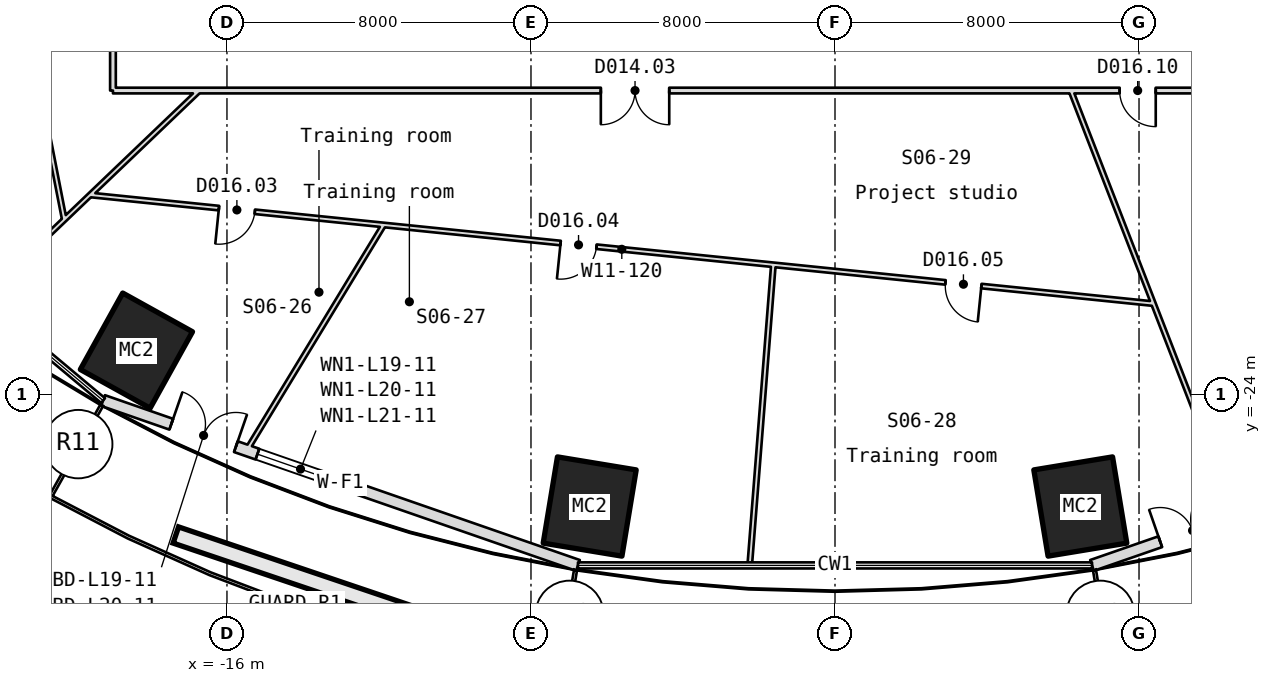
"""IFC4 building model, lengths in metres.
Left out: names, types, materials, properties, quantities, classifications, styles, units other than length and angle.
Written with IfcOpenShell. Run it as: python <this file> out.ifc"""

import sys

from ifc_helpers import new_model, si_unit, direction, frame, frame_2d, origin, origin_2d, place, context, subcontext, project, spatial, rectangle, hollow_rectangle, extrude, element, fill, save


model = new_model("IFC4")
c1 = context("Model", 3, precision=1e-05, world=origin(), true_north=direction((0.0, 1.0)))
c2 = subcontext(c1, "Body", "Model", "MODEL_VIEW")
j1 = project(units=[si_unit("LENGTHUNIT", "METRE"), si_unit("PLANEANGLEUNIT", "RADIAN")], contexts=[c1])
p1 = place(None, origin())
s1 = spatial("IfcSite", under=j1, at=p1, CompositionType="ELEMENT")
p2 = place(p1, origin())
s2 = spatial("IfcBuilding", under=s1, at=p2, CompositionType="ELEMENT")
p3 = place(p2, frame((0.0, 0.0, 95.25)))
s3 = spatial("IfcBuildingStorey", under=s2, at=p3, CompositionType="ELEMENT", Elevation=95.25)
for number, where, z_axis, x_axis in (
    (1, (-18.383, -22.843, -0.18), (0.0, 0.0, 1.0), (-0.874, 0.485, 0.0)),
    (2, (-6.455, -26.945, -0.18), (0.0, 0.0, 1.0), (-0.987, 0.163, 0.0)),
    (3, (6.455, -26.945, -0.18), (0.0, 0.0, 1.0), (-0.987, -0.163, 0.0)),
):
    element("IfcColumn", number, at=place(p3, frame(where, z_axis=z_axis, x_axis=x_axis)), inside=s3, PredefinedType="COLUMN", context=c2, shape_type="SweptSolid", body=[
        extrude(hollow_rectangle(XDim=2.1, YDim=2.3, WallThickness=0.085, at=origin_2d()), origin(), (0.0, 0.0, 1.0), 4.15),
    ])
p4 = place(p3, frame((-19.26, -24.157, 0.0), z_axis=(0.0, 0.0, 1.0), x_axis=(0.944700030718, -0.327935743647, 0.0)))
e4 = element("IfcWall", 4, at=p4, inside=s3, PredefinedType="SOLIDWALL", context=c2, shape_type="SweptSolid", body=[
    extrude(rectangle(XDim=13.229, YDim=0.3, at=frame_2d((6.614, 0.0))), origin(), (0.0, 0.0, 1.0), 3.97),
])
p5 = place(p4, frame((1.9, 0.0, 0.0)))
e5 = element("IfcOpeningElement", 5, at=p5, cuts=e4, PredefinedType="OPENING", context=c2, shape_type="SweptSolid", body=[
    extrude(rectangle(XDim=1.8, YDim=2.4, at=frame_2d((0.9, 1.2))), frame((0.0, 0.16, 0.0), z_axis=(0.0, -1.0, 0.0), x_axis=(1.0, 0.0, 0.0)), (0.0, 0.0, 1.0), 0.32),
])
p6 = place(p4, frame((4.3, 0.0, 0.9)))
e6 = element("IfcOpeningElement", 6, at=p6, cuts=e4, PredefinedType="OPENING", context=c2, shape_type="SweptSolid", body=[
    extrude(rectangle(XDim=2.4, YDim=1.5, at=frame_2d((1.2, 0.75))), frame((0.0, 0.16, 0.0), z_axis=(0.0, -1.0, 0.0), x_axis=(1.0, 0.0, 0.0)), (0.0, 0.0, 1.0), 0.32),
])
p7 = place(p3, frame((6.763, -28.495, 0.0), z_axis=(0.0, 0.0, 1.0), x_axis=(0.944700030718, 0.327935743647, 0.0)))
e7 = element("IfcWall", 7, at=p7, inside=s3, PredefinedType="SOLIDWALL", context=c2, shape_type="SweptSolid", body=[
    extrude(rectangle(XDim=13.229, YDim=0.3, at=frame_2d((6.614, 0.0))), origin(), (0.0, 0.0, 1.0), 3.97),
])
p8 = place(p7, frame((1.9, 0.0, 0.0)))
e8 = element("IfcOpeningElement", 8, at=p8, cuts=e7, PredefinedType="OPENING", context=c2, shape_type="SweptSolid", body=[
    extrude(rectangle(XDim=1.8, YDim=2.4, at=frame_2d((0.9, 1.2))), frame((0.0, 0.16, 0.0), z_axis=(0.0, -1.0, 0.0), x_axis=(1.0, 0.0, 0.0)), (0.0, 0.0, 1.0), 0.32),
])
p9 = place(p7, frame((4.3, 0.0, 0.9)))
e9 = element("IfcOpeningElement", 9, at=p9, cuts=e7, PredefinedType="OPENING", context=c2, shape_type="SweptSolid", body=[
    extrude(rectangle(XDim=2.4, YDim=1.5, at=frame_2d((1.2, 0.75))), frame((0.0, 0.16, 0.0), z_axis=(0.0, -1.0, 0.0), x_axis=(1.0, 0.0, 0.0)), (0.0, 0.0, 1.0), 0.32),
])
p10 = place(p3, frame((-24.299, 1.102, 0.0), z_axis=(0.0, 0.0, 1.0), x_axis=(0.192428584769, -0.98131098015, 0.0)))
e10 = element("IfcWall", 10, at=p10, inside=s3, PredefinedType="PARTITIONING", context=c2, shape_type="SweptSolid", body=[
    extrude(rectangle(XDim=20.888, YDim=0.12, at=frame_2d((10.444, 0.0))), origin(), (0.0, 0.0, 1.0), 3.97),
])
p11 = place(p3, frame((-19.601, -18.747, 0.0), z_axis=(0.0, 0.0, 1.0), x_axis=(0.994814570483, -0.101705311343, 0.0)))
e11 = element("IfcWall", 11, at=p11, inside=s3, PredefinedType="PARTITIONING", context=c2, shape_type="SweptSolid", body=[
    extrude(rectangle(XDim=28.126, YDim=0.12, at=frame_2d((14.063, 0.0))), origin(), (0.0, 0.0, 1.0), 3.97),
])
p12 = place(p11, frame((3.407, 0.0, 0.0)))
e12 = element("IfcOpeningElement", 12, at=p12, cuts=e11, PredefinedType="OPENING", context=c2, shape_type="SweptSolid", body=[
    extrude(rectangle(XDim=0.95, YDim=2.1, at=frame_2d((0.475, 1.05))), frame((0.0, 0.07, 0.0), z_axis=(0.0, -1.0, 0.0), x_axis=(1.0, 0.0, 0.0)), (0.0, 0.0, 1.0), 0.14),
])
p13 = place(p11, frame((12.444, 0.0, 0.0)))
e13 = element("IfcOpeningElement", 13, at=p13, cuts=e11, PredefinedType="OPENING", context=c2, shape_type="SweptSolid", body=[
    extrude(rectangle(XDim=0.95, YDim=2.1, at=frame_2d((0.475, 1.05))), frame((0.0, 0.07, 0.0), z_axis=(0.0, -1.0, 0.0), x_axis=(1.0, 0.0, 0.0)), (0.0, 0.0, 1.0), 0.14),
])
p14 = place(p11, frame((22.625, 0.0, 0.0)))
e14 = element("IfcOpeningElement", 14, at=p14, cuts=e11, PredefinedType="OPENING", context=c2, shape_type="SweptSolid", body=[
    extrude(rectangle(XDim=0.95, YDim=2.1, at=frame_2d((0.475, 1.05))), frame((0.0, 0.07, 0.0), z_axis=(0.0, -1.0, 0.0), x_axis=(1.0, 0.0, 0.0)), (0.0, 0.0, 1.0), 0.14),
])
p15 = place(p3, frame((-19.0, -16.0, 0.0), z_axis=(0.0, 0.0, 1.0), x_axis=(0.0, 1.0, 0.0)))
e15 = element("IfcWall", 15, at=p15, inside=s3, PredefinedType="PARTITIONING", context=c2, shape_type="SweptSolid", body=[
    extrude(rectangle(XDim=32.0, YDim=0.15, at=frame_2d((16.0, 0.0))), origin(), (0.0, 0.0, 1.0), 3.97),
])
p16 = place(p15, frame((12.057, 0.0, 0.0)))
e16 = element("IfcOpeningElement", 16, at=p16, cuts=e15, PredefinedType="OPENING", context=c2, shape_type="SweptSolid", body=[
    extrude(rectangle(XDim=0.95, YDim=2.1, at=frame_2d((0.475, 1.05))), frame((0.0, 0.085, 0.0), z_axis=(0.0, -1.0, 0.0), x_axis=(1.0, 0.0, 0.0)), (0.0, 0.0, 1.0), 0.17),
])
p17 = place(p15, frame((3.626, 0.0, 0.0)))
e17 = element("IfcOpeningElement", 17, at=p17, cuts=e15, PredefinedType="OPENING", context=c2, shape_type="SweptSolid", body=[
    extrude(rectangle(XDim=0.95, YDim=2.1, at=frame_2d((0.475, 1.05))), frame((0.0, 0.085, 0.0), z_axis=(0.0, -1.0, 0.0), x_axis=(1.0, 0.0, 0.0)), (0.0, 0.0, 1.0), 0.17),
])
p18 = place(p15, frame((19.428, 0.0, 0.0)))
e18 = element("IfcOpeningElement", 18, at=p18, cuts=e15, PredefinedType="OPENING", context=c2, shape_type="SweptSolid", body=[
    extrude(rectangle(XDim=1.8, YDim=2.1, at=frame_2d((0.9, 1.05))), frame((0.0, 0.085, 0.0), z_axis=(0.0, -1.0, 0.0), x_axis=(1.0, 0.0, 0.0)), (0.0, 0.0, 1.0), 0.17),
])
p19 = place(p3, frame((-16.729, -16.0, 0.0), z_axis=(0.0, 0.0, 1.0), x_axis=(-0.722671289977, -0.69119187397, 0.0)))
e19 = element("IfcWall", 19, at=p19, inside=s3, PredefinedType="PARTITIONING", context=c2, shape_type="SweptSolid", body=[
    extrude(rectangle(XDim=7.926, YDim=0.12, at=frame_2d((3.963, 0.0))), origin(), (0.0, 0.0, 1.0), 3.97),
])
p20 = place(p3, frame((-15.482, -25.469, 0.0), z_axis=(0.0, 0.0, 1.0), x_axis=(0.519421340377, 0.854518268477, 0.0)))
e20 = element("IfcWall", 20, at=p20, inside=s3, PredefinedType="PARTITIONING", context=c2, shape_type="SweptSolid", body=[
    extrude(rectangle(XDim=6.942, YDim=0.12, at=frame_2d((3.471, 0.0))), origin(), (0.0, 0.0, 1.0), 3.97),
])
p21 = place(p3, frame((-2.244, -28.495, 0.0), z_axis=(0.0, 0.0, 1.0), x_axis=(0.07852464167, 0.996912172987, 0.0)))
e21 = element("IfcWall", 21, at=p21, inside=s3, PredefinedType="PARTITIONING", context=c2, shape_type="SweptSolid", body=[
    extrude(rectangle(XDim=7.934, YDim=0.12, at=frame_2d((3.967, 0.0))), origin(), (0.0, 0.0, 1.0), 3.97),
])
p22 = place(p3, frame((6.205, -16.0, 0.0), z_axis=(0.0, 0.0, 1.0), x_axis=(0.361589601178, -0.932337364005, 0.0)))
e22 = element("IfcWall", 22, at=p22, inside=s3, PredefinedType="PARTITIONING", context=c2, shape_type="SweptSolid", body=[
    extrude(rectangle(XDim=11.995, YDim=0.12, at=frame_2d((5.997, 0.0))), origin(), (0.0, 0.0, 1.0), 3.97),
])
p23 = place(p3, frame((19.0, -16.0, 0.0), z_axis=(0.0, 0.0, 1.0), x_axis=(-1.0, 0.0, 0.0)))
e23 = element("IfcWall", 23, at=p23, inside=s3, PredefinedType="PARTITIONING", context=c2, shape_type="SweptSolid", body=[
    extrude(rectangle(XDim=38.0, YDim=0.15, at=frame_2d((19.0, 0.0))), origin(), (0.0, 0.0, 1.0), 3.97),
])
p24 = place(p23, frame((23.362, 0.0, 0.0)))
e24 = element("IfcOpeningElement", 24, at=p24, cuts=e23, PredefinedType="OPENING", context=c2, shape_type="SweptSolid", body=[
    extrude(rectangle(XDim=1.8, YDim=2.1, at=frame_2d((0.9, 1.05))), frame((0.0, 0.085, 0.0), z_axis=(0.0, -1.0, 0.0), x_axis=(1.0, 0.0, 0.0)), (0.0, 0.0, 1.0), 0.17),
])
p25 = place(p23, frame((6.62, 0.0, 0.0)))
e25 = element("IfcOpeningElement", 25, at=p25, cuts=e23, PredefinedType="OPENING", context=c2, shape_type="SweptSolid", body=[
    extrude(rectangle(XDim=0.95, YDim=2.1, at=frame_2d((0.475, 1.05))), frame((0.0, 0.085, 0.0), z_axis=(0.0, -1.0, 0.0), x_axis=(1.0, 0.0, 0.0)), (0.0, 0.0, 1.0), 0.17),
])
p26 = place(p23, frame((1.982, 0.0, 0.0)))
e26 = element("IfcOpeningElement", 26, at=p26, cuts=e23, PredefinedType="OPENING", context=c2, shape_type="SweptSolid", body=[
    extrude(rectangle(XDim=0.95, YDim=2.1, at=frame_2d((0.475, 1.05))), frame((0.0, 0.085, 0.0), z_axis=(0.0, -1.0, 0.0), x_axis=(1.0, 0.0, 0.0)), (0.0, 0.0, 1.0), 0.17),
])
p27 = place(p23, frame((10.56, 0.0, 0.0)))
e27 = element("IfcOpeningElement", 27, at=p27, cuts=e23, PredefinedType="OPENING", context=c2, shape_type="SweptSolid", body=[
    extrude(rectangle(XDim=0.95, YDim=2.1, at=frame_2d((0.475, 1.05))), frame((0.0, 0.085, 0.0), z_axis=(0.0, -1.0, 0.0), x_axis=(1.0, 0.0, 0.0)), (0.0, 0.0, 1.0), 0.17),
])
p28 = place(p5, origin())
e28 = element("IfcDoor", 28, at=p28, inside=s3, OperationType="SINGLE_SWING_LEFT", PredefinedType="DOOR", context=c2, shape_type="SweptSolid", body=[
    extrude(rectangle(XDim=1.8, YDim=2.4, at=frame_2d((0.9, 1.2))), frame((0.0, 0.025, 0.0), z_axis=(0.0, -1.0, 0.0), x_axis=(1.0, 0.0, 0.0)), (0.0, 0.0, 1.0), 0.05),
])
fill(e5, e28)
p29 = place(p6, origin())
e29 = element("IfcWindow", 29, at=p29, inside=s3, PartitioningType="SINGLE_PANEL", PredefinedType="WINDOW", context=c2, shape_type="SweptSolid", body=[
    extrude(rectangle(XDim=2.4, YDim=1.5, at=frame_2d((1.2, 0.75))), frame((0.0, 0.03, 0.0), z_axis=(0.0, -1.0, 0.0), x_axis=(1.0, 0.0, 0.0)), (0.0, 0.0, 1.0), 0.06),
])
fill(e6, e29)
p30 = place(p8, origin())
e30 = element("IfcDoor", 30, at=p30, inside=s3, OperationType="SINGLE_SWING_LEFT", PredefinedType="DOOR", context=c2, shape_type="SweptSolid", body=[
    extrude(rectangle(XDim=1.8, YDim=2.4, at=frame_2d((0.9, 1.2))), frame((0.0, 0.025, 0.0), z_axis=(0.0, -1.0, 0.0), x_axis=(1.0, 0.0, 0.0)), (0.0, 0.0, 1.0), 0.05),
])
fill(e8, e30)
p31 = place(p12, frame((0.95, 0.0, 0.0), z_axis=(0.0, 0.0, 1.0), x_axis=(-1.0, 0.0, 0.0)))
e31 = element("IfcDoor", 31, at=p31, inside=s3, OperationType="SINGLE_SWING_LEFT", PredefinedType="DOOR", context=c2, shape_type="SweptSolid", body=[
    extrude(rectangle(XDim=0.95, YDim=2.1, at=frame_2d((0.475, 1.05))), frame((0.0, 0.025, 0.0), z_axis=(0.0, -1.0, 0.0), x_axis=(1.0, 0.0, 0.0)), (0.0, 0.0, 1.0), 0.05),
])
fill(e12, e31)
p32 = place(p13, frame((0.95, 0.0, 0.0), z_axis=(0.0, 0.0, 1.0), x_axis=(-1.0, 0.0, 0.0)))
e32 = element("IfcDoor", 32, at=p32, inside=s3, OperationType="SINGLE_SWING_LEFT", PredefinedType="DOOR", context=c2, shape_type="SweptSolid", body=[
    extrude(rectangle(XDim=0.95, YDim=2.1, at=frame_2d((0.475, 1.05))), frame((0.0, 0.025, 0.0), z_axis=(0.0, -1.0, 0.0), x_axis=(1.0, 0.0, 0.0)), (0.0, 0.0, 1.0), 0.05),
])
fill(e13, e32)
p33 = place(p14, frame((0.95, 0.0, 0.0), z_axis=(0.0, 0.0, 1.0), x_axis=(-1.0, 0.0, 0.0)))
e33 = element("IfcDoor", 33, at=p33, inside=s3, OperationType="SINGLE_SWING_LEFT", PredefinedType="DOOR", context=c2, shape_type="SweptSolid", body=[
    extrude(rectangle(XDim=0.95, YDim=2.1, at=frame_2d((0.475, 1.05))), frame((0.0, 0.025, 0.0), z_axis=(0.0, -1.0, 0.0), x_axis=(1.0, 0.0, 0.0)), (0.0, 0.0, 1.0), 0.05),
])
fill(e14, e33)
p34 = place(p24, origin())
e34 = element("IfcDoor", 34, at=p34, inside=s3, OperationType="DOUBLE_DOOR_SINGLE_SWING", PredefinedType="DOOR", context=c2, shape_type="SweptSolid", body=[
    extrude(rectangle(XDim=1.8, YDim=2.1, at=frame_2d((0.9, 1.05))), frame((0.0, 0.025, 0.0), z_axis=(0.0, -1.0, 0.0), x_axis=(1.0, 0.0, 0.0)), (0.0, 0.0, 1.0), 0.05),
])
fill(e24, e34)
p35 = place(p27, origin())
e35 = element("IfcDoor", 35, at=p35, inside=s3, OperationType="SINGLE_SWING_RIGHT", PredefinedType="DOOR", context=c2, shape_type="SweptSolid", body=[
    extrude(rectangle(XDim=0.95, YDim=2.1, at=frame_2d((0.475, 1.05))), frame((0.0, 0.025, 0.0), z_axis=(0.0, -1.0, 0.0), x_axis=(1.0, 0.0, 0.0)), (0.0, 0.0, 1.0), 0.05),
])
fill(e27, e35)
save(model, sys.argv[1])
